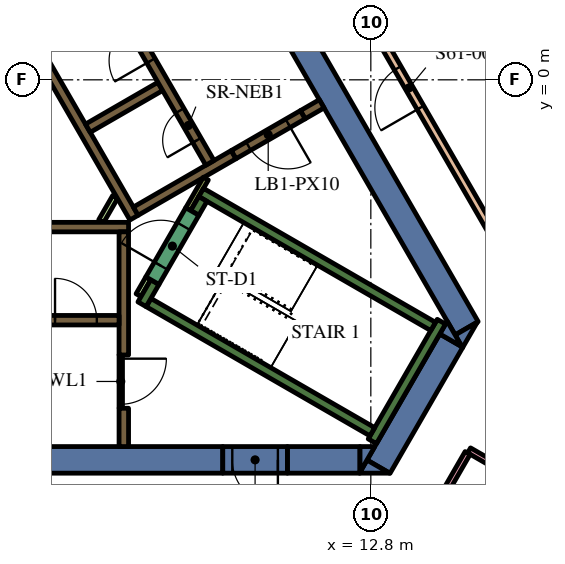
"""IFC4 building model, lengths in metres.
Left out: names, types, materials, properties, quantities, classifications, styles, units other than length and angle.
Written with IfcOpenShell. Run it as: python <this file> out.ifc"""

import sys

from ifc_helpers import new_model, si_unit, direction, frame, frame_2d, origin, place, context, subcontext, project, spatial, polyline, rectangle, outline, extrude, element, fill, save


model = new_model("IFC4")
c1 = context("Model", 3, precision=1e-05, world=origin(), true_north=direction((0.0, 1.0)))
c2 = subcontext(c1, "Body", "Model", "MODEL_VIEW")
j1 = project(units=[si_unit("LENGTHUNIT", "METRE"), si_unit("PLANEANGLEUNIT", "RADIAN")], contexts=[c1])
p1 = place(None, origin())
s1 = spatial("IfcSite", under=j1, at=p1, CompositionType="ELEMENT")
p2 = place(p1, origin())
s2 = spatial("IfcBuilding", under=s1, at=p2, CompositionType="ELEMENT")
p3 = place(p2, frame((0.0, 0.0, 261.6)))
s3 = spatial("IfcBuildingStorey", under=s2, at=p3, CompositionType="ELEMENT", Elevation=261.6)
p4 = place(p3, frame((9.085, 4.264, 0.0), z_axis=(0.0, 0.0, 1.0), x_axis=(0.499998082512, -0.866026510844, 0.0)))
e1 = element("IfcWall", 1, at=p4, inside=s3, PredefinedType="SOLIDWALL", context=c2, shape_type="SweptSolid", body=[
    extrude(rectangle(XDim=12.472, YDim=0.7, at=frame_2d((6.236, 0.0))), origin(), (0.0, 0.0, 1.0), 5.4),
])
p5 = place(p3, origin())
e2 = element("IfcWall", 2, at=p5, inside=s3, PredefinedType="SOLIDWALL", context=c2, shape_type="SweptSolid", body=[
    extrude(outline(polyline([(15.213, -7.05), (15.019, -6.714), (15.601, -6.378), (15.213, -7.05)])), origin(), (0.0, 0.0, 1.0), 5.4),
])
p6 = place(p3, frame((13.003, -10.179, 0.0), z_axis=(0.0, 0.0, 1.0), x_axis=(0.499972675833, 0.866041178825, 0.0)))
e3 = element("IfcWall", 3, at=p6, inside=s3, PredefinedType="SOLIDWALL", context=c2, shape_type="SweptSolid", body=[
    extrude(rectangle(XDim=3.829, YDim=0.7, at=frame_2d((1.915, 0.0))), origin(), (0.0, 0.0, 1.0), 5.4),
])
e4 = element("IfcWall", 4, at=p5, inside=s3, PredefinedType="SOLIDWALL", context=c2, shape_type="SweptSolid", body=[
    extrude(outline(polyline([(12.698, -10.005), (13.296, -10.35), (12.5, -10.35), (12.698, -10.005)])), origin(), (0.0, 0.0, 1.0), 5.4),
])
e5 = element("IfcWall", 5, at=p5, inside=s3, PredefinedType="SOLIDWALL", context=c2, shape_type="SweptSolid", body=[
    extrude(outline(polyline([(14.809, -6.35), (15.197, -7.022), (14.615, -6.686), (14.809, -6.35)])), origin(), (0.0, 0.0, 1.0), 5.4),
])
p7 = place(p3, frame((10.604, -10.0, 0.0), z_axis=(0.0, 0.0, 1.0), x_axis=(1.0, 0.0, 0.0)))
e6 = element("IfcWall", 6, at=p7, inside=s3, PredefinedType="SOLIDWALL", context=c2, shape_type="SweptSolid", body=[
    extrude(rectangle(XDim=1.909, YDim=0.7, at=frame_2d((0.955, 0.0))), origin(), (0.0, 0.0, 1.0), 5.4),
])
e7 = element("IfcWall", 7, at=p5, inside=s3, PredefinedType="SOLIDWALL", context=c2, shape_type="SweptSolid", body=[
    extrude(outline(polyline([(12.904, -9.65), (12.516, -10.322), (12.516, -9.65), (12.904, -9.65)])), origin(), (0.0, 0.0, 1.0), 5.4),
])
p8 = place(p3, frame((8.904, -10.0, 0.0), z_axis=(0.0, 0.0, 1.0), x_axis=(-1.0, 0.0, 0.0)))
e8 = element("IfcWall", 8, at=p8, inside=s3, PredefinedType="SOLIDWALL", context=c2, shape_type="SweptSolid", body=[
    extrude(rectangle(XDim=22.226, YDim=0.7, at=frame_2d((11.113, 0.0))), origin(), (0.0, 0.0, 1.0), 5.4),
])
p9 = place(p3, frame((12.84, -9.511, 0.0), z_axis=(0.0, 0.0, 1.0), x_axis=(0.500048121057, 0.865997619297, 0.0)))
e9 = element("IfcWall", 9, at=p9, inside=s3, PredefinedType="SOLIDWALL", context=c2, shape_type="SweptSolid", body=[
    extrude(rectangle(XDim=3.634, YDim=0.25, at=frame_2d((1.817, 0.0))), origin(), (0.0, 0.0, 1.0), 5.4),
])
p10 = place(p3, frame((12.84, -9.261, 0.0), z_axis=(0.0, 0.0, 1.0), x_axis=(-0.866013990052, 0.500019768644, 0.0)))
e10 = element("IfcWall", 10, at=p10, inside=s3, PredefinedType="SOLIDWALL", context=c2, shape_type="SweptSolid", body=[
    extrude(rectangle(XDim=6.8, YDim=0.25, at=frame_2d((3.4, 0.0))), origin(), (0.0, 0.0, 1.0), 5.4),
])
p11 = place(p3, frame((6.78, -5.906, 0.0), z_axis=(0.0, 0.0, 1.0), x_axis=(0.500223362819, 0.865896406789, 0.0)))
e11 = element("IfcWall", 11, at=p11, inside=s3, PredefinedType="SOLIDWALL", context=c2, shape_type="SweptSolid", body=[
    extrude(rectangle(XDim=0.675, YDim=0.25, at=frame_2d((0.337, 0.0))), origin(), (0.0, 0.0, 1.0), 5.4),
])
p12 = place(p3, frame((8.334, -2.964, 0.0), z_axis=(0.0, 0.0, 1.0), x_axis=(0.866016039709, -0.500016218704, 0.0)))
e12 = element("IfcWall", 12, at=p12, inside=s3, PredefinedType="SOLIDWALL", context=c2, shape_type="SweptSolid", body=[
    extrude(rectangle(XDim=7.05, YDim=0.25, at=frame_2d((3.525, 0.0))), origin(), (0.0, 0.0, 1.0), 5.4),
])
p13 = place(p3, frame((8.168, -3.503, 0.0), z_axis=(0.0, 0.0, 1.0), x_axis=(0.49972245349, 0.866185586049, 0.0)))
e13 = element("IfcWall", 13, at=p13, inside=s3, PredefinedType="SOLIDWALL", context=c2, shape_type="SweptSolid", body=[
    extrude(rectangle(XDim=0.425, YDim=0.25, at=frame_2d((0.212, 0.0))), origin(), (0.0, 0.0, 1.0), 5.4),
])
p14 = place(p3, frame((-5.545, -3.875, 0.0), z_axis=(0.0, 0.0, 1.0), x_axis=(1.0, 0.0, 0.0)))
e14 = element("IfcWall", 14, at=p14, inside=s3, PredefinedType="SOLIDWALL", context=c2, shape_type="SweptSolid", body=[
    extrude(rectangle(XDim=11.97, YDim=0.25, at=frame_2d((5.985, 0.0))), origin(), (0.0, 0.0, 1.0), 5.4),
])
p15 = place(p3, frame((6.3, -7.24, 0.0), z_axis=(0.0, 0.0, 1.0), x_axis=(0.0, 1.0, 0.0)))
e15 = element("IfcWall", 15, at=p15, inside=s3, PredefinedType="SOLIDWALL", context=c2, shape_type="SweptSolid", body=[
    extrude(rectangle(XDim=3.24, YDim=0.25, at=frame_2d((1.62, 0.0))), origin(), (0.0, 0.0, 1.0), 5.4),
])
p16 = place(p3, frame((6.3, -9.65, 0.0), z_axis=(0.0, 0.0, 1.0), x_axis=(0.0, 1.0, 0.0)))
e16 = element("IfcWall", 16, at=p16, inside=s3, PredefinedType="SOLIDWALL", context=c2, shape_type="SweptSolid", body=[
    extrude(rectangle(XDim=1.008, YDim=0.25, at=frame_2d((0.504, 0.0))), origin(), (0.0, 0.0, 1.0), 5.4),
])
p17 = place(p3, frame((11.507, -0.631, 0.0), z_axis=(0.0, 0.0, 1.0), x_axis=(-0.866093731455, -0.499881634324, 0.0)))
e17 = element("IfcWall", 17, at=p17, inside=s3, PredefinedType="SOLIDWALL", context=c2, shape_type="SweptSolid", body=[
    extrude(rectangle(XDim=0.575, YDim=0.25, at=frame_2d((0.288, 0.0))), origin(), (0.0, 0.0, 1.0), 5.4),
])
p18 = place(p3, frame((6.568, -3.627, 0.0), z_axis=(0.0, 0.0, 1.0), x_axis=(-0.499999455981, 0.866025717874, 0.0)))
e18 = element("IfcWall", 18, at=p18, inside=s3, PredefinedType="SOLIDWALL", context=c2, shape_type="SweptSolid", body=[
    extrude(rectangle(XDim=11.978, YDim=0.25, at=frame_2d((5.989, 0.0))), origin(), (0.0, 0.0, 1.0), 5.4),
])
p19 = place(p3, frame((5.354, -1.274, 0.0), z_axis=(0.0, 0.0, 1.0), x_axis=(0.866008176907, 0.50002983664, 0.0)))
e19 = element("IfcWall", 19, at=p19, inside=s3, PredefinedType="SOLIDWALL", context=c2, shape_type="SweptSolid", body=[
    extrude(rectangle(XDim=2.2, YDim=0.25, at=frame_2d((1.1, 0.0))), origin(), (0.0, 0.0, 1.0), 5.4),
])
p20 = place(p3, frame((6.614, -3.456, 0.0), z_axis=(0.0, 0.0, 1.0), x_axis=(0.866032512851, 0.499987686533, 0.0)))
e20 = element("IfcWall", 20, at=p20, inside=s3, PredefinedType="SOLIDWALL", context=c2, shape_type="SweptSolid", body=[
    extrude(rectangle(XDim=2.975, YDim=0.25, at=frame_2d((1.487, 0.0))), origin(), (0.0, 0.0, 1.0), 5.4),
])
p21 = place(p3, frame((6.945, -5.222, 0.0), z_axis=(0.0, 0.0, 1.0), x_axis=(-0.499818422106, -0.866130212453, 0.0)))
e21 = element("IfcWall", 21, at=p21, inside=s3, PredefinedType="PARTITIONING", context=c2, shape_type="SweptSolid", body=[
    extrude(rectangle(XDim=0.514, YDim=0.15, at=frame_2d((0.257, 0.0))), origin(), (0.0, 0.0, 1.0), 4.75),
])
p22 = place(p3, frame((8.459, -2.599, 0.0), z_axis=(0.0, 0.0, 1.0), x_axis=(-0.500041054325, -0.866001699761, 0.0)))
e22 = element("IfcWall", 22, at=p22, inside=s3, PredefinedType="PARTITIONING", context=c2, shape_type="SweptSolid", body=[
    extrude(rectangle(XDim=0.929, YDim=0.15, at=frame_2d((0.464, 0.0))), origin(), (0.0, 0.0, 1.0), 5.4),
])
p23 = place(p3, frame((5.705, -3.718, 0.0), z_axis=(0.0, 0.0, 1.0), x_axis=(0.499962090823, 0.866047289552, 0.0)))
e23 = element("IfcWall", 23, at=p23, inside=s3, PredefinedType="PARTITIONING", context=c2, shape_type="SweptSolid", body=[
    extrude(rectangle(XDim=0.735, YDim=0.15, at=frame_2d((0.367, 0.0))), origin(), (0.0, 0.0, 1.0), 4.75),
])
p24 = place(p3, frame((-6.175, -6.325, 0.0), z_axis=(0.0, 0.0, 1.0), x_axis=(1.0, 0.0, 0.0)))
e24 = element("IfcWall", 24, at=p24, inside=s3, PredefinedType="SOLIDWALL", context=c2, shape_type="SweptSolid", body=[
    extrude(rectangle(XDim=12.35, YDim=0.25, at=frame_2d((6.175, 0.0))), origin(), (0.0, 0.0, 1.0), 5.4),
])
p25 = place(p24, frame((3.205, 0.0, 0.0)))
e25 = element("IfcOpeningElement", 25, at=p25, cuts=e24, PredefinedType="OPENING", context=c2, shape_type="SweptSolid", body=[
    extrude(rectangle(XDim=0.9, YDim=2.1, at=frame_2d((0.45, 1.05))), frame((0.0, 0.135, 0.0), z_axis=(0.0, -1.0, 0.0), x_axis=(1.0, 0.0, 0.0)), (0.0, 0.0, 1.0), 0.27),
])
p26 = place(p24, frame((8.145, 0.0, 0.0)))
e26 = element("IfcOpeningElement", 26, at=p26, cuts=e24, PredefinedType="OPENING", context=c2, shape_type="SweptSolid", body=[
    extrude(rectangle(XDim=1.1, YDim=2.1, at=frame_2d((0.55, 1.05))), frame((0.0, 0.135, 0.0), z_axis=(0.0, -1.0, 0.0), x_axis=(1.0, 0.0, 0.0)), (0.0, 0.0, 1.0), 0.27),
])
p27 = place(p24, frame((10.665, 0.0, 0.0)))
e27 = element("IfcOpeningElement", 27, at=p27, cuts=e24, PredefinedType="OPENING", context=c2, shape_type="SweptSolid", body=[
    extrude(rectangle(XDim=1.1, YDim=2.1, at=frame_2d((0.55, 1.05))), frame((0.0, 0.135, 0.0), z_axis=(0.0, -1.0, 0.0), x_axis=(1.0, 0.0, 0.0)), (0.0, 0.0, 1.0), 0.27),
])
p28 = place(p3, frame((8.565, -2.185, 0.0), z_axis=(0.0, 0.0, 1.0), x_axis=(-0.499997954832, 0.866026584559, 0.0)))
e28 = element("IfcWall", 28, at=p28, inside=s3, PredefinedType="SOLIDWALL", context=c2, shape_type="SweptSolid", body=[
    extrude(rectangle(XDim=12.35, YDim=0.25, at=frame_2d((6.175, 0.0))), origin(), (0.0, 0.0, 1.0), 5.4),
])
p29 = place(p28, frame((0.685, 0.0, 0.0)))
e29 = element("IfcOpeningElement", 29, at=p29, cuts=e28, PredefinedType="OPENING", context=c2, shape_type="SweptSolid", body=[
    extrude(rectangle(XDim=0.9, YDim=2.1, at=frame_2d((0.45, 1.05))), frame((0.0, 0.135, 0.0), z_axis=(0.0, -1.0, 0.0), x_axis=(1.0, 0.0, 0.0)), (0.0, 0.0, 1.0), 0.27),
])
p30 = place(p28, frame((3.105, 0.0, 0.0)))
e30 = element("IfcOpeningElement", 30, at=p30, cuts=e28, PredefinedType="OPENING", context=c2, shape_type="SweptSolid", body=[
    extrude(rectangle(XDim=1.1, YDim=2.1, at=frame_2d((0.55, 1.05))), frame((0.0, 0.135, 0.0), z_axis=(0.0, -1.0, 0.0), x_axis=(1.0, 0.0, 0.0)), (0.0, 0.0, 1.0), 0.27),
])
p31 = place(p28, frame((5.625, 0.0, 0.0)))
e31 = element("IfcOpeningElement", 31, at=p31, cuts=e28, PredefinedType="OPENING", context=c2, shape_type="SweptSolid", body=[
    extrude(rectangle(XDim=1.1, YDim=2.1, at=frame_2d((0.55, 1.05))), frame((0.0, 0.135, 0.0), z_axis=(0.0, -1.0, 0.0), x_axis=(1.0, 0.0, 0.0)), (0.0, 0.0, 1.0), 0.27),
])
p32 = place(p28, frame((8.145, 0.0, 0.0)))
e32 = element("IfcOpeningElement", 32, at=p32, cuts=e28, PredefinedType="OPENING", context=c2, shape_type="SweptSolid", body=[
    extrude(rectangle(XDim=1.1, YDim=2.1, at=frame_2d((0.55, 1.05))), frame((0.0, 0.135, 0.0), z_axis=(0.0, -1.0, 0.0), x_axis=(1.0, 0.0, 0.0)), (0.0, 0.0, 1.0), 0.27),
])
p33 = place(p28, frame((10.665, 0.0, 0.0)))
e33 = element("IfcOpeningElement", 33, at=p33, cuts=e28, PredefinedType="OPENING", context=c2, shape_type="SweptSolid", body=[
    extrude(rectangle(XDim=1.1, YDim=2.1, at=frame_2d((0.55, 1.05))), frame((0.0, 0.135, 0.0), z_axis=(0.0, -1.0, 0.0), x_axis=(1.0, 0.0, 0.0)), (0.0, 0.0, 1.0), 0.27),
])
p34 = place(p3, frame((7.053, -5.284, 0.0), z_axis=(0.0, 0.0, 1.0), x_axis=(0.500078061341, 0.865980330357, 0.0)))
e34 = element("IfcWall", 34, at=p34, inside=s3, PredefinedType="SOLIDWALL", context=c2, shape_type="SweptSolid", body=[
    extrude(rectangle(XDim=2.1, YDim=0.4, at=frame_2d((1.05, 0.0))), origin(), (0.0, 0.0, 1.0), 5.4),
])
p35 = place(p34, frame((0.45, 0.0, 0.0)))
e35 = element("IfcOpeningElement", 35, at=p35, cuts=e34, PredefinedType="OPENING", context=c2, shape_type="SweptSolid", body=[
    extrude(rectangle(XDim=1.2, YDim=2.1, at=frame_2d((0.6, 1.05))), frame((0.0, 0.21, 0.0), z_axis=(0.0, -1.0, 0.0), x_axis=(1.0, 0.0, 0.0)), (0.0, 0.0, 1.0), 0.42),
])
p36 = place(p3, frame((6.22, -7.237, 0.0), z_axis=(0.0, 0.0, 1.0), x_axis=(0.0, -1.0, 0.0)))
e36 = element("IfcWall", 36, at=p36, inside=s3, PredefinedType="PARTITIONING", context=c2, shape_type="SweptSolid", body=[
    extrude(rectangle(XDim=1.4, YDim=0.09, at=frame_2d((0.7, 0.0))), origin(), (0.0, 0.0, 1.0), 4.75),
])
p37 = place(p36, frame((0.1, 0.0, 0.0)))
e37 = element("IfcOpeningElement", 37, at=p37, cuts=e36, PredefinedType="OPENING", context=c2, shape_type="SweptSolid", body=[
    extrude(rectangle(XDim=1.2, YDim=2.1, at=frame_2d((0.6, 1.05))), frame((0.0, 0.055, 0.0), z_axis=(0.0, -1.0, 0.0), x_axis=(1.0, 0.0, 0.0)), (0.0, 0.0, 1.0), 0.11),
])
p38 = place(p3, frame((11.009, -0.919, 0.0), z_axis=(0.0, 0.0, 1.0), x_axis=(-0.866059744384, -0.49994051562, 0.0)))
e38 = element("IfcWall", 38, at=p38, inside=s3, PredefinedType="SOLIDWALL", context=c2, shape_type="SweptSolid", body=[
    extrude(rectangle(XDim=2.1, YDim=0.25, at=frame_2d((1.05, 0.0))), origin(), (0.0, 0.0, 1.0), 5.4),
])
p39 = place(p38, frame((0.45, 0.0, 0.0)))
e39 = element("IfcOpeningElement", 39, at=p39, cuts=e38, PredefinedType="OPENING", context=c2, shape_type="SweptSolid", body=[
    extrude(rectangle(XDim=1.2, YDim=2.1, at=frame_2d((0.6, 1.05))), frame((0.0, 0.135, 0.0), z_axis=(0.0, -1.0, 0.0), x_axis=(1.0, 0.0, 0.0)), (0.0, 0.0, 1.0), 0.27),
])
p40 = place(p3, frame((10.604, -10.0, 0.0), z_axis=(0.0, 0.0, 1.0), x_axis=(-1.0, 0.0, 0.0)))
e40 = element("IfcWall", 40, at=p40, inside=s3, PredefinedType="SOLIDWALL", context=c2, shape_type="SweptSolid", body=[
    extrude(rectangle(XDim=1.7, YDim=0.7, at=frame_2d((0.85, 0.0))), origin(), (0.0, 0.0, 1.0), 5.4),
])
p41 = place(p40, frame((0.25, 0.0, 0.0)))
e41 = element("IfcOpeningElement", 41, at=p41, cuts=e40, PredefinedType="OPENING", context=c2, shape_type="SweptSolid", body=[
    extrude(rectangle(XDim=1.2, YDim=2.1, at=frame_2d((0.6, 1.05))), frame((0.0, 0.36, 0.0), z_axis=(0.0, -1.0, 0.0), x_axis=(1.0, 0.0, 0.0)), (0.0, 0.0, 1.0), 0.72),
])
p42 = place(p3, frame((17.349, -6.35, 0.0), z_axis=(0.0, 0.0, 1.0), x_axis=(-0.499997784101, 0.866026683131, 0.0)))
e42 = element("IfcWall", 42, at=p42, inside=s3, PredefinedType="PARTITIONING", context=c2, shape_type="SweptSolid", body=[
    extrude(rectangle(XDim=14.174, YDim=0.2, at=frame_2d((7.087, 0.0))), origin(), (0.0, 0.0, 1.0), 4.75),
])
p43 = place(p42, frame((6.487, 0.0, 0.0)))
e43 = element("IfcOpeningElement", 43, at=p43, cuts=e42, PredefinedType="OPENING", context=c2, shape_type="SweptSolid", body=[
    extrude(rectangle(XDim=1.2, YDim=2.1, at=frame_2d((0.6, 1.05))), frame((0.0, 0.11, 0.0), z_axis=(0.0, -1.0, 0.0), x_axis=(1.0, 0.0, 0.0)), (0.0, 0.0, 1.0), 0.22),
])
p44 = place(p3, frame((20.02, -12.425, 0.0), z_axis=(0.0, 0.0, 1.0), x_axis=(-0.866024483152, 0.500001594578, 0.0)))
e44 = element("IfcWall", 44, at=p44, inside=s3, PredefinedType="PARTITIONING", context=c2, shape_type="SweptSolid", body=[
    extrude(rectangle(XDim=5.35, YDim=0.15, at=frame_2d((2.675, 0.0))), origin(), (0.0, 0.0, 1.0), 4.75),
])
p45 = place(p3, frame((15.347, -9.819, 0.0), z_axis=(0.0, 0.0, 1.0), x_axis=(-0.50001657589, -0.866015833478, 0.0)))
e45 = element("IfcWall", 45, at=p45, inside=s3, PredefinedType="PARTITIONING", context=c2, shape_type="SweptSolid", body=[
    extrude(rectangle(XDim=2.275, YDim=0.15, at=frame_2d((1.138, 0.0))), origin(), (0.0, 0.0, 1.0), 4.75),
])
p46 = place(p27, origin())
e46 = element("IfcDoor", 46, at=p46, inside=s3, OperationType="DOUBLE_DOOR_SLIDING", PredefinedType="DOOR", context=c2, shape_type="SweptSolid", body=[
    extrude(rectangle(XDim=1.1, YDim=2.1, at=frame_2d((0.55, 1.05))), frame((0.0, 0.025, 0.0), z_axis=(0.0, -1.0, 0.0), x_axis=(1.0, 0.0, 0.0)), (0.0, 0.0, 1.0), 0.05),
])
fill(e27, e46)
p47 = place(p29, origin())
e47 = element("IfcDoor", 47, at=p47, inside=s3, OperationType="SINGLE_SWING_LEFT", PredefinedType="DOOR", context=c2, shape_type="SweptSolid", body=[
    extrude(rectangle(XDim=0.9, YDim=2.1, at=frame_2d((0.45, 1.05))), frame((0.0, 0.025, 0.0), z_axis=(0.0, -1.0, 0.0), x_axis=(1.0, 0.0, 0.0)), (0.0, 0.0, 1.0), 0.05),
])
fill(e29, e47)
p48 = place(p30, origin())
e48 = element("IfcDoor", 48, at=p48, inside=s3, OperationType="DOUBLE_DOOR_SLIDING", PredefinedType="DOOR", context=c2, shape_type="SweptSolid", body=[
    extrude(rectangle(XDim=1.1, YDim=2.1, at=frame_2d((0.55, 1.05))), frame((0.0, 0.025, 0.0), z_axis=(0.0, -1.0, 0.0), x_axis=(1.0, 0.0, 0.0)), (0.0, 0.0, 1.0), 0.05),
])
fill(e30, e48)
p49 = place(p35, origin())
e49 = element("IfcDoor", 49, at=p49, inside=s3, OperationType="SINGLE_SWING_LEFT", PredefinedType="DOOR", context=c2, shape_type="SweptSolid", body=[
    extrude(rectangle(XDim=1.2, YDim=2.1, at=frame_2d((0.6, 1.05))), frame((0.0, 0.025, 0.0), z_axis=(0.0, -1.0, 0.0), x_axis=(1.0, 0.0, 0.0)), (0.0, 0.0, 1.0), 0.05),
])
fill(e35, e49)
p50 = place(p37, origin())
e50 = element("IfcDoor", 50, at=p50, inside=s3, OperationType="SINGLE_SWING_LEFT", PredefinedType="DOOR", context=c2, shape_type="SweptSolid", body=[
    extrude(rectangle(XDim=1.2, YDim=2.1, at=frame_2d((0.6, 1.05))), frame((0.0, 0.025, 0.0), z_axis=(0.0, -1.0, 0.0), x_axis=(1.0, 0.0, 0.0)), (0.0, 0.0, 1.0), 0.05),
])
fill(e37, e50)
p51 = place(p39, origin())
e51 = element("IfcDoor", 51, at=p51, inside=s3, OperationType="SINGLE_SWING_LEFT", PredefinedType="DOOR", context=c2, shape_type="SweptSolid", body=[
    extrude(rectangle(XDim=1.2, YDim=2.1, at=frame_2d((0.6, 1.05))), frame((0.0, 0.025, 0.0), z_axis=(0.0, -1.0, 0.0), x_axis=(1.0, 0.0, 0.0)), (0.0, 0.0, 1.0), 0.05),
])
fill(e39, e51)
p52 = place(p41, origin())
e52 = element("IfcDoor", 52, at=p52, inside=s3, OperationType="SINGLE_SWING_LEFT", PredefinedType="DOOR", context=c2, shape_type="SweptSolid", body=[
    extrude(rectangle(XDim=1.2, YDim=2.1, at=frame_2d((0.6, 1.05))), frame((0.0, 0.025, 0.0), z_axis=(0.0, -1.0, 0.0), x_axis=(1.0, 0.0, 0.0)), (0.0, 0.0, 1.0), 0.05),
])
fill(e41, e52)
p53 = place(p43, origin())
e53 = element("IfcDoor", 53, at=p53, inside=s3, OperationType="SINGLE_SWING_RIGHT", PredefinedType="DOOR", context=c2, shape_type="SweptSolid", body=[
    extrude(rectangle(XDim=1.2, YDim=2.1, at=frame_2d((0.6, 1.05))), frame((0.0, 0.025, 0.0), z_axis=(0.0, -1.0, 0.0), x_axis=(1.0, 0.0, 0.0)), (0.0, 0.0, 1.0), 0.05),
])
fill(e43, e53)
save(model, sys.argv[1])
